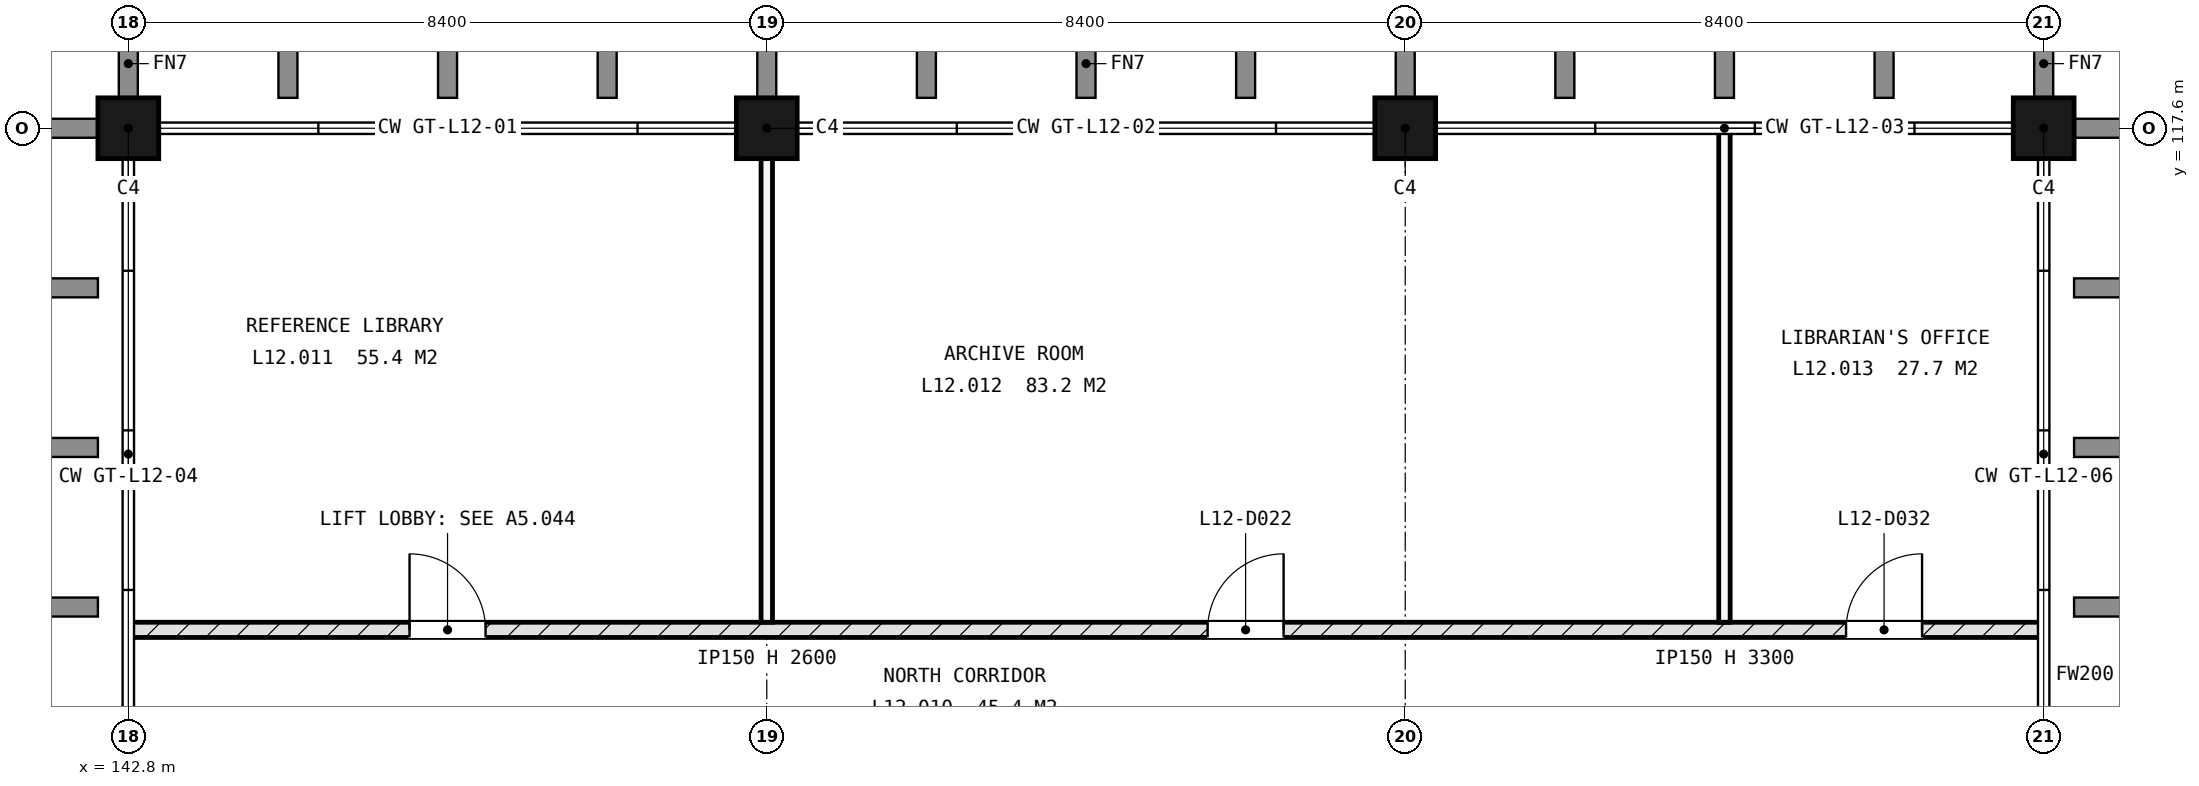
"""IFC4 building model, lengths in metres.
Left out: names, types, materials, properties, quantities, classifications, styles, units other than length and angle.
Written with IfcOpenShell. Run it as: python <this file> out.ifc"""

import sys

from ifc_helpers import new_model, si_unit, direction, frame, frame_2d, origin, origin_2d, place, context, subcontext, project, spatial, rectangle, extrude, element, fill, save


model = new_model("IFC4")
c1 = context("Model", 3, precision=1e-05, world=origin(), true_north=direction((0.0, 1.0)))
c2 = subcontext(c1, "Body", "Model", "MODEL_VIEW")
j1 = project(units=[si_unit("LENGTHUNIT", "METRE"), si_unit("PLANEANGLEUNIT", "RADIAN")], contexts=[c1])
p1 = place(None, origin())
s1 = spatial("IfcSite", under=j1, at=p1, CompositionType="ELEMENT")
p2 = place(p1, origin())
s2 = spatial("IfcBuilding", under=s1, at=p2, CompositionType="ELEMENT")
p3 = place(p2, frame((0.0, 0.0, 46.8)))
s3 = spatial("IfcBuildingStorey", under=s2, at=p3, CompositionType="ELEMENT", Elevation=46.8)
for number, where, z_axis, x_axis in (
    (1, (142.8, 117.6, -0.225), (0.0, 0.0, 1.0), (1.0, 0.0, 0.0)),
    (2, (151.2, 117.6, -0.225), (0.0, 0.0, 1.0), (1.0, 0.0, 0.0)),
    (3, (159.6, 117.6, -0.225), (0.0, 0.0, 1.0), (1.0, 0.0, 0.0)),
    (4, (168.0, 117.6, -0.225), (0.0, 0.0, 1.0), (1.0, 0.0, 0.0)),
):
    element("IfcColumn", number, at=place(p3, frame(where, z_axis=z_axis, x_axis=x_axis)), inside=s3, PredefinedType="COLUMN", context=c2, shape_type="SweptSolid", body=[
        extrude(rectangle(XDim=0.8, YDim=0.8, at=origin_2d()), origin(), (0.0, 0.0, 1.0), 3.525),
    ])
p4 = place(p3, frame((142.8, 111.0, 0.0), z_axis=(0.0, 0.0, 1.0), x_axis=(1.0, 0.0, 0.0)))
e5 = element("IfcWall", 5, at=p4, inside=s3, PredefinedType="SOLIDWALL", context=c2, shape_type="SweptSolid", body=[
    extrude(rectangle(XDim=25.2, YDim=0.2, at=frame_2d((12.6, 0.0))), origin(), (0.0, 0.0, 1.0), 3.3),
])
p5 = place(p4, frame((3.7, 0.0, 0.0)))
e6 = element("IfcOpeningElement", 6, at=p5, cuts=e5, PredefinedType="OPENING", context=c2, shape_type="SweptSolid", body=[
    extrude(rectangle(XDim=1.0, YDim=2.1, at=frame_2d((0.5, 1.05))), frame((0.0, 0.11, 0.0), z_axis=(0.0, -1.0, 0.0), x_axis=(1.0, 0.0, 0.0)), (0.0, 0.0, 1.0), 0.22),
])
p6 = place(p4, frame((14.2, 0.0, 0.0)))
e7 = element("IfcOpeningElement", 7, at=p6, cuts=e5, PredefinedType="OPENING", context=c2, shape_type="SweptSolid", body=[
    extrude(rectangle(XDim=1.0, YDim=2.1, at=frame_2d((0.5, 1.05))), frame((0.0, 0.11, 0.0), z_axis=(0.0, -1.0, 0.0), x_axis=(1.0, 0.0, 0.0)), (0.0, 0.0, 1.0), 0.22),
])
p7 = place(p4, frame((22.6, 0.0, 0.0)))
e8 = element("IfcOpeningElement", 8, at=p7, cuts=e5, PredefinedType="OPENING", context=c2, shape_type="SweptSolid", body=[
    extrude(rectangle(XDim=1.0, YDim=2.1, at=frame_2d((0.5, 1.05))), frame((0.0, 0.11, 0.0), z_axis=(0.0, -1.0, 0.0), x_axis=(1.0, 0.0, 0.0)), (0.0, 0.0, 1.0), 0.22),
])
p8 = place(p3, frame((151.2, 111.1, 0.0), z_axis=(0.0, 0.0, 1.0), x_axis=(0.0, 1.0, 0.0)))
e9 = element("IfcWall", 9, at=p8, inside=s3, PredefinedType="PARTITIONING", context=c2, shape_type="SweptSolid", body=[
    extrude(rectangle(XDim=6.5, YDim=0.15, at=frame_2d((3.25, 0.0))), origin(), (0.0, 0.0, 1.0), 2.6),
])
p9 = place(p3, frame((163.8, 111.1, 0.0), z_axis=(0.0, 0.0, 1.0), x_axis=(0.0, 1.0, 0.0)))
e10 = element("IfcWall", 10, at=p9, inside=s3, PredefinedType="PARTITIONING", context=c2, shape_type="SweptSolid", body=[
    extrude(rectangle(XDim=6.5, YDim=0.15, at=frame_2d((3.25, 0.0))), origin(), (0.0, 0.0, 1.0), 3.3),
])
p10 = place(p5, origin())
e11 = element("IfcDoor", 11, at=p10, inside=s3, OperationType="SINGLE_SWING_RIGHT", PredefinedType="DOOR", context=c2, shape_type="SweptSolid", body=[
    extrude(rectangle(XDim=1.0, YDim=2.1, at=frame_2d((0.5, 1.05))), frame((0.0, 0.025, 0.0), z_axis=(0.0, -1.0, 0.0), x_axis=(1.0, 0.0, 0.0)), (0.0, 0.0, 1.0), 0.05),
])
fill(e6, e11)
p11 = place(p6, origin())
e12 = element("IfcDoor", 12, at=p11, inside=s3, OperationType="SINGLE_SWING_LEFT", PredefinedType="DOOR", context=c2, shape_type="SweptSolid", body=[
    extrude(rectangle(XDim=1.0, YDim=2.1, at=frame_2d((0.5, 1.05))), frame((0.0, 0.025, 0.0), z_axis=(0.0, -1.0, 0.0), x_axis=(1.0, 0.0, 0.0)), (0.0, 0.0, 1.0), 0.05),
])
fill(e7, e12)
p12 = place(p7, origin())
e13 = element("IfcDoor", 13, at=p12, inside=s3, OperationType="SINGLE_SWING_LEFT", PredefinedType="DOOR", context=c2, shape_type="SweptSolid", body=[
    extrude(rectangle(XDim=1.0, YDim=2.1, at=frame_2d((0.5, 1.05))), frame((0.0, 0.025, 0.0), z_axis=(0.0, -1.0, 0.0), x_axis=(1.0, 0.0, 0.0)), (0.0, 0.0, 1.0), 0.05),
])
fill(e8, e13)
save(model, sys.argv[1])
